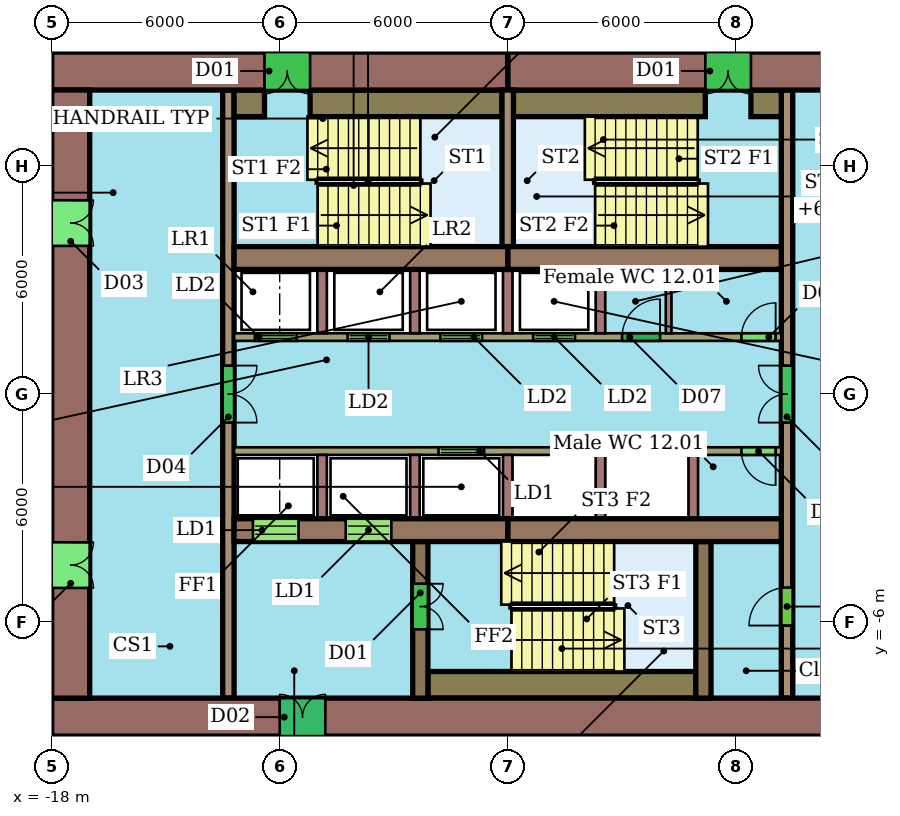
"""IFC4 building model, lengths in metres.
Left out: names, types, materials, properties, quantities, classifications, styles, units other than length and angle.
Written with IfcOpenShell. Run it as: python <this file> out.ifc"""

import sys

from ifc_helpers import new_model, si_unit, direction, frame, frame_2d, origin, place, context, subcontext, project, spatial, rectangle, extrude, element, fill, save


model = new_model("IFC4")
c1 = context("Model", 3, precision=1e-05, world=origin(), true_north=direction((0.0, 1.0)))
c2 = subcontext(c1, "Body", "Model", "MODEL_VIEW")
j1 = project(units=[si_unit("LENGTHUNIT", "METRE"), si_unit("PLANEANGLEUNIT", "RADIAN")], contexts=[c1])
p1 = place(None, origin())
s1 = spatial("IfcSite", under=j1, at=p1, CompositionType="ELEMENT")
p2 = place(p1, origin())
s2 = spatial("IfcBuilding", under=s1, at=p2, CompositionType="ELEMENT")
p3 = place(p2, frame((0.0, 0.0, 61.9)))
s3 = spatial("IfcBuildingStorey", under=s2, at=p3, CompositionType="ELEMENT", Elevation=61.9)
p4 = place(p3, frame((6.0, 8.5, 0.0), z_axis=(0.0, 0.0, 1.0), x_axis=(-1.0, 0.0, 0.0)))
e1 = element("IfcWall", 1, at=p4, inside=s3, PredefinedType="SHEAR", context=c2, shape_type="SweptSolid", body=[
    extrude(rectangle(XDim=12.0, YDim=1.0, at=frame_2d((6.0, 0.0))), origin(), (0.0, 0.0, 1.0), 3.4),
])
p5 = place(p4, frame((5.6, 0.0, 0.0)))
e2 = element("IfcOpeningElement", 2, at=p5, cuts=e1, PredefinedType="OPENING", context=c2, shape_type="SweptSolid", body=[
    extrude(rectangle(XDim=1.2, YDim=2.1, at=frame_2d((0.6, 1.05))), frame((0.0, 0.51, 0.0), z_axis=(0.0, -1.0, 0.0), x_axis=(1.0, 0.0, 0.0)), (0.0, 0.0, 1.0), 1.02),
])
p6 = place(p3, frame((-6.0, 8.5, 0.0), z_axis=(0.0, 0.0, 1.0), x_axis=(-1.0, 0.0, 0.0)))
e3 = element("IfcWall", 3, at=p6, inside=s3, PredefinedType="SHEAR", context=c2, shape_type="SweptSolid", body=[
    extrude(rectangle(XDim=12.0, YDim=1.0, at=frame_2d((6.0, 0.0))), origin(), (0.0, 0.0, 1.0), 3.4),
])
p7 = place(p6, frame((5.2, 0.0, 0.0)))
e4 = element("IfcOpeningElement", 4, at=p7, cuts=e3, PredefinedType="OPENING", context=c2, shape_type="SweptSolid", body=[
    extrude(rectangle(XDim=1.2, YDim=2.1, at=frame_2d((0.6, 1.05))), frame((0.0, 0.51, 0.0), z_axis=(0.0, -1.0, 0.0), x_axis=(1.0, 0.0, 0.0)), (0.0, 0.0, 1.0), 1.02),
])
p8 = place(p3, frame((-18.0, -8.5, 0.0), z_axis=(0.0, 0.0, 1.0), x_axis=(1.0, 0.0, 0.0)))
e5 = element("IfcWall", 5, at=p8, inside=s3, PredefinedType="SHEAR", context=c2, shape_type="SweptSolid", body=[
    extrude(rectangle(XDim=24.0, YDim=1.0, at=frame_2d((12.0, 0.0))), origin(), (0.0, 0.0, 1.0), 3.4),
])
p9 = place(p8, frame((6.0, 0.0, 0.0)))
e6 = element("IfcOpeningElement", 6, at=p9, cuts=e5, PredefinedType="OPENING", context=c2, shape_type="SweptSolid", body=[
    extrude(rectangle(XDim=1.2, YDim=2.1, at=frame_2d((0.6, 1.05))), frame((0.0, 0.51, 0.0), z_axis=(0.0, -1.0, 0.0), x_axis=(1.0, 0.0, 0.0)), (0.0, 0.0, 1.0), 1.02),
])
p10 = place(p3, frame((-17.5, 8.0, 0.0), z_axis=(0.0, 0.0, 1.0), x_axis=(0.0, -1.0, 0.0)))
e7 = element("IfcWall", 7, at=p10, inside=s3, PredefinedType="SHEAR", context=c2, shape_type="SweptSolid", body=[
    extrude(rectangle(XDim=16.0, YDim=1.0, at=frame_2d((8.0, 0.0))), origin(), (0.0, 0.0, 1.0), 3.4),
])
p11 = place(p10, frame((11.9, 0.0, 0.0)))
e8 = element("IfcOpeningElement", 8, at=p11, cuts=e7, PredefinedType="OPENING", context=c2, shape_type="SweptSolid", body=[
    extrude(rectangle(XDim=1.2, YDim=2.1, at=frame_2d((0.6, 1.05))), frame((0.0, 0.51, 0.0), z_axis=(0.0, -1.0, 0.0), x_axis=(1.0, 0.0, 0.0)), (0.0, 0.0, 1.0), 1.02),
])
p12 = place(p10, frame((2.9, 0.0, 0.0)))
e9 = element("IfcOpeningElement", 9, at=p12, cuts=e7, PredefinedType="OPENING", context=c2, shape_type="SweptSolid", body=[
    extrude(rectangle(XDim=1.2, YDim=2.1, at=frame_2d((0.6, 1.05))), frame((0.0, 0.51, 0.0), z_axis=(0.0, -1.0, 0.0), x_axis=(1.0, 0.0, 0.0)), (0.0, 0.0, 1.0), 1.02),
])
for number, where, z_axis, x_axis in (
    (10, (-13.2, 3.58, 0.0), (0.0, 0.0, 1.0), (1.0, 0.0, 0.0)),
    (11, (-6.0, 3.58, 0.0), (0.0, 0.0, 1.0), (1.0, 0.0, 0.0)),
):
    element("IfcWall", number, at=place(p3, frame(where, z_axis=z_axis, x_axis=x_axis)), inside=s3, PredefinedType="SHEAR", context=c2, shape_type="SweptSolid", body=[
        extrude(rectangle(XDim=7.2, YDim=0.6, at=frame_2d((3.6, 0.0))), origin(), (0.0, 0.0, 1.0), 3.4),
    ])
p13 = place(p3, frame((-13.2, -3.58, 0.0), z_axis=(0.0, 0.0, 1.0), x_axis=(1.0, 0.0, 0.0)))
e12 = element("IfcWall", 12, at=p13, inside=s3, PredefinedType="SHEAR", context=c2, shape_type="SweptSolid", body=[
    extrude(rectangle(XDim=7.2, YDim=0.6, at=frame_2d((3.6, 0.0))), origin(), (0.0, 0.0, 1.0), 3.4),
])
p14 = place(p13, frame((0.496, 0.0, 0.0)))
e13 = element("IfcOpeningElement", 13, at=p14, cuts=e12, PredefinedType="OPENING", context=c2, shape_type="SweptSolid", body=[
    extrude(rectangle(XDim=1.2, YDim=2.1, at=frame_2d((0.6, 1.05))), frame((0.0, 0.31, 0.0), z_axis=(0.0, -1.0, 0.0), x_axis=(1.0, 0.0, 0.0)), (0.0, 0.0, 1.0), 0.62),
])
p15 = place(p13, frame((2.938, 0.0, 0.0)))
e14 = element("IfcOpeningElement", 14, at=p15, cuts=e12, PredefinedType="OPENING", context=c2, shape_type="SweptSolid", body=[
    extrude(rectangle(XDim=1.2, YDim=2.1, at=frame_2d((0.6, 1.05))), frame((0.0, 0.31, 0.0), z_axis=(0.0, -1.0, 0.0), x_axis=(1.0, 0.0, 0.0)), (0.0, 0.0, 1.0), 0.62),
])
p16 = place(p3, frame((-6.0, -3.58, 0.0), z_axis=(0.0, 0.0, 1.0), x_axis=(1.0, 0.0, 0.0)))
e15 = element("IfcWall", 15, at=p16, inside=s3, PredefinedType="SHEAR", context=c2, shape_type="SweptSolid", body=[
    extrude(rectangle(XDim=7.2, YDim=0.6, at=frame_2d((3.6, 0.0))), origin(), (0.0, 0.0, 1.0), 3.4),
])
p17 = place(p3, frame((-13.35, 8.0, 0.0), z_axis=(0.0, 0.0, 1.0), x_axis=(0.0, -1.0, 0.0)))
e16 = element("IfcWall", 16, at=p17, inside=s3, PredefinedType="SHEAR", context=c2, shape_type="SweptSolid", body=[
    extrude(rectangle(XDim=16.0, YDim=0.3, at=frame_2d((8.0, 0.0))), origin(), (0.0, 0.0, 1.0), 3.4),
])
p18 = place(p17, frame((7.25, 0.0, 0.0)))
e17 = element("IfcOpeningElement", 17, at=p18, cuts=e16, PredefinedType="OPENING", context=c2, shape_type="SweptSolid", body=[
    extrude(rectangle(XDim=1.5, YDim=2.1, at=frame_2d((0.75, 1.05))), frame((0.0, 0.16, 0.0), z_axis=(0.0, -1.0, 0.0), x_axis=(1.0, 0.0, 0.0)), (0.0, 0.0, 1.0), 0.32),
])
p19 = place(p3, frame((1.35, -8.0, 0.0), z_axis=(0.0, 0.0, 1.0), x_axis=(0.0, 1.0, 0.0)))
e18 = element("IfcWall", 18, at=p19, inside=s3, PredefinedType="SHEAR", context=c2, shape_type="SweptSolid", body=[
    extrude(rectangle(XDim=16.0, YDim=0.3, at=frame_2d((8.0, 0.0))), origin(), (0.0, 0.0, 1.0), 3.4),
])
p20 = place(p19, frame((1.91, 0.0, 0.0)))
e19 = element("IfcOpeningElement", 19, at=p20, cuts=e18, PredefinedType="OPENING", context=c2, shape_type="SweptSolid", body=[
    extrude(rectangle(XDim=1.0, YDim=2.1, at=frame_2d((0.5, 1.05))), frame((0.0, 0.16, 0.0), z_axis=(0.0, -1.0, 0.0), x_axis=(1.0, 0.0, 0.0)), (0.0, 0.0, 1.0), 0.32),
])
p21 = place(p19, frame((7.25, 0.0, 0.0)))
e20 = element("IfcOpeningElement", 20, at=p21, cuts=e18, PredefinedType="OPENING", context=c2, shape_type="SweptSolid", body=[
    extrude(rectangle(XDim=1.5, YDim=2.1, at=frame_2d((0.75, 1.05))), frame((0.0, 0.16, 0.0), z_axis=(0.0, -1.0, 0.0), x_axis=(1.0, 0.0, 0.0)), (0.0, 0.0, 1.0), 0.32),
])
p22 = place(p3, frame((-13.2, 1.5, 0.0), z_axis=(0.0, 0.0, 1.0), x_axis=(1.0, 0.0, 0.0)))
e21 = element("IfcWall", 21, at=p22, inside=s3, PredefinedType="SHEAR", context=c2, shape_type="SweptSolid", body=[
    extrude(rectangle(XDim=14.4, YDim=0.2, at=frame_2d((7.2, 0.0))), origin(), (0.0, 0.0, 1.0), 3.4),
])
p23 = place(p22, frame((0.546, 0.0, 0.0)))
e22 = element("IfcOpeningElement", 22, at=p23, cuts=e21, PredefinedType="OPENING", context=c2, shape_type="SweptSolid", body=[
    extrude(rectangle(XDim=1.1, YDim=2.1, at=frame_2d((0.55, 1.05))), frame((0.0, 0.11, 0.0), z_axis=(0.0, -1.0, 0.0), x_axis=(1.0, 0.0, 0.0)), (0.0, 0.0, 1.0), 0.22),
])
p24 = place(p22, frame((2.988, 0.0, 0.0)))
e23 = element("IfcOpeningElement", 23, at=p24, cuts=e21, PredefinedType="OPENING", context=c2, shape_type="SweptSolid", body=[
    extrude(rectangle(XDim=1.1, YDim=2.1, at=frame_2d((0.55, 1.05))), frame((0.0, 0.11, 0.0), z_axis=(0.0, -1.0, 0.0), x_axis=(1.0, 0.0, 0.0)), (0.0, 0.0, 1.0), 0.22),
])
p25 = place(p22, frame((5.429, 0.0, 0.0)))
e24 = element("IfcOpeningElement", 24, at=p25, cuts=e21, PredefinedType="OPENING", context=c2, shape_type="SweptSolid", body=[
    extrude(rectangle(XDim=1.1, YDim=2.1, at=frame_2d((0.55, 1.05))), frame((0.0, 0.11, 0.0), z_axis=(0.0, -1.0, 0.0), x_axis=(1.0, 0.0, 0.0)), (0.0, 0.0, 1.0), 0.22),
])
p26 = place(p22, frame((7.871, 0.0, 0.0)))
e25 = element("IfcOpeningElement", 25, at=p26, cuts=e21, PredefinedType="OPENING", context=c2, shape_type="SweptSolid", body=[
    extrude(rectangle(XDim=1.1, YDim=2.1, at=frame_2d((0.55, 1.05))), frame((0.0, 0.11, 0.0), z_axis=(0.0, -1.0, 0.0), x_axis=(1.0, 0.0, 0.0)), (0.0, 0.0, 1.0), 0.22),
])
p27 = place(p22, frame((10.21, 0.0, 0.0)))
e26 = element("IfcOpeningElement", 26, at=p27, cuts=e21, PredefinedType="OPENING", context=c2, shape_type="SweptSolid", body=[
    extrude(rectangle(XDim=1.0, YDim=2.1, at=frame_2d((0.5, 1.05))), frame((0.0, 0.11, 0.0), z_axis=(0.0, -1.0, 0.0), x_axis=(1.0, 0.0, 0.0)), (0.0, 0.0, 1.0), 0.22),
])
p28 = place(p22, frame((13.35, 0.0, 0.0)))
e27 = element("IfcOpeningElement", 27, at=p28, cuts=e21, PredefinedType="OPENING", context=c2, shape_type="SweptSolid", body=[
    extrude(rectangle(XDim=0.9, YDim=2.1, at=frame_2d((0.45, 1.05))), frame((0.0, 0.11, 0.0), z_axis=(0.0, -1.0, 0.0), x_axis=(1.0, 0.0, 0.0)), (0.0, 0.0, 1.0), 0.22),
])
p29 = place(p3, frame((1.2, -1.5, 0.0), z_axis=(0.0, 0.0, 1.0), x_axis=(-1.0, 0.0, 0.0)))
e28 = element("IfcWall", 28, at=p29, inside=s3, PredefinedType="SHEAR", context=c2, shape_type="SweptSolid", body=[
    extrude(rectangle(XDim=14.4, YDim=0.2, at=frame_2d((7.2, 0.0))), origin(), (0.0, 0.0, 1.0), 3.4),
])
p30 = place(p29, frame((7.821, 0.0, 0.0)))
e29 = element("IfcOpeningElement", 29, at=p30, cuts=e28, PredefinedType="OPENING", context=c2, shape_type="SweptSolid", body=[
    extrude(rectangle(XDim=1.2, YDim=2.1, at=frame_2d((0.6, 1.05))), frame((0.0, 0.11, 0.0), z_axis=(0.0, -1.0, 0.0), x_axis=(1.0, 0.0, 0.0)), (0.0, 0.0, 1.0), 0.22),
])
p31 = place(p29, frame((0.15, 0.0, 0.0)))
e30 = element("IfcOpeningElement", 30, at=p31, cuts=e28, PredefinedType="OPENING", context=c2, shape_type="SweptSolid", body=[
    extrude(rectangle(XDim=0.9, YDim=2.1, at=frame_2d((0.45, 1.05))), frame((0.0, 0.11, 0.0), z_axis=(0.0, -1.0, 0.0), x_axis=(1.0, 0.0, 0.0)), (0.0, 0.0, 1.0), 0.22),
])
p32 = place(p3, frame((-8.3, -3.88, 0.0), z_axis=(0.0, 0.0, 1.0), x_axis=(0.0, -1.0, 0.0)))
e31 = element("IfcWall", 31, at=p32, inside=s3, PredefinedType="SHEAR", context=c2, shape_type="SweptSolid", body=[
    extrude(rectangle(XDim=4.12, YDim=0.4, at=frame_2d((2.06, 0.0))), origin(), (0.0, 0.0, 1.0), 3.4),
])
p33 = place(p32, frame((1.11, 0.0, 0.0)))
e32 = element("IfcOpeningElement", 32, at=p33, cuts=e31, PredefinedType="OPENING", context=c2, shape_type="SweptSolid", body=[
    extrude(rectangle(XDim=1.2, YDim=2.1, at=frame_2d((0.6, 1.05))), frame((0.0, 0.21, 0.0), z_axis=(0.0, -1.0, 0.0), x_axis=(1.0, 0.0, 0.0)), (0.0, 0.0, 1.0), 0.42),
])
p34 = place(p3, frame((-0.85, -3.88, 0.0), z_axis=(0.0, 0.0, 1.0), x_axis=(0.0, -1.0, 0.0)))
e33 = element("IfcWall", 33, at=p34, inside=s3, PredefinedType="SHEAR", context=c2, shape_type="SweptSolid", body=[
    extrude(rectangle(XDim=4.12, YDim=0.4, at=frame_2d((2.06, 0.0))), origin(), (0.0, 0.0, 1.0), 3.4),
])
p35 = place(p3, frame((-6.0, 3.88, 0.0), z_axis=(0.0, 0.0, 1.0), x_axis=(0.0, 1.0, 0.0)))
e34 = element("IfcWall", 34, at=p35, inside=s3, PredefinedType="SHEAR", context=c2, shape_type="SweptSolid", body=[
    extrude(rectangle(XDim=4.12, YDim=0.3, at=frame_2d((2.06, 0.0))), origin(), (0.0, 0.0, 1.0), 3.4),
])
p36 = place(p3, frame((-13.2, 7.65, 0.0), z_axis=(0.0, 0.0, 1.0), x_axis=(1.0, 0.0, 0.0)))
e35 = element("IfcWall", 35, at=p36, inside=s3, PredefinedType="SHEAR", context=c2, shape_type="SweptSolid", body=[
    extrude(rectangle(XDim=0.8, YDim=0.7, at=frame_2d((0.4, 0.0))), origin(), (0.0, 0.0, 1.0), 3.4),
])
for number, where, z_axis, x_axis in (
    (36, (-11.2, 7.65, 0.0), (0.0, 0.0, 1.0), (1.0, 0.0, 0.0)),
    (37, (-5.85, 7.65, 0.0), (0.0, 0.0, 1.0), (1.0, 0.0, 0.0)),
):
    element("IfcWall", number, at=place(p3, frame(where, z_axis=z_axis, x_axis=x_axis)), inside=s3, PredefinedType="SHEAR", context=c2, shape_type="SweptSolid", body=[
        extrude(rectangle(XDim=5.05, YDim=0.7, at=frame_2d((2.525, 0.0))), origin(), (0.0, 0.0, 1.0), 3.4),
    ])
p37 = place(p3, frame((0.4, 7.65, 0.0), z_axis=(0.0, 0.0, 1.0), x_axis=(1.0, 0.0, 0.0)))
e38 = element("IfcWall", 38, at=p37, inside=s3, PredefinedType="SHEAR", context=c2, shape_type="SweptSolid", body=[
    extrude(rectangle(XDim=0.8, YDim=0.7, at=frame_2d((0.4, 0.0))), origin(), (0.0, 0.0, 1.0), 3.4),
])
p38 = place(p3, frame((-8.1, -7.65, 0.0), z_axis=(0.0, 0.0, 1.0), x_axis=(1.0, 0.0, 0.0)))
e39 = element("IfcWall", 39, at=p38, inside=s3, PredefinedType="SHEAR", context=c2, shape_type="SweptSolid", body=[
    extrude(rectangle(XDim=7.05, YDim=0.7, at=frame_2d((3.525, 0.0))), origin(), (0.0, 0.0, 1.0), 3.4),
])
for number, where, z_axis, x_axis in (
    (40, (-10.883, 1.6, 0.0), (0.0, 0.0, 1.0), (0.0, 1.0, 0.0)),
    (41, (-8.442, 1.6, 0.0), (0.0, 0.0, 1.0), (0.0, 1.0, 0.0)),
    (42, (-6.0, 1.6, 0.0), (0.0, 0.0, 1.0), (0.0, 1.0, 0.0)),
    (43, (-3.558, 1.6, 0.0), (0.0, 0.0, 1.0), (0.0, 1.0, 0.0)),
):
    element("IfcWall", number, at=place(p3, frame(where, z_axis=z_axis, x_axis=x_axis)), inside=s3, PredefinedType="SHEAR", context=c2, shape_type="SweptSolid", body=[
        extrude(rectangle(XDim=1.68, YDim=0.25, at=frame_2d((0.84, 0.0))), origin(), (0.0, 0.0, 1.0), 3.4),
    ])
p39 = place(p3, frame((-1.765, 1.6, 0.0), z_axis=(0.0, 0.0, 1.0), x_axis=(0.0, 1.0, 0.0)))
e44 = element("IfcWall", 44, at=p39, inside=s3, PredefinedType="PARTITIONING", context=c2, shape_type="SweptSolid", body=[
    extrude(rectangle(XDim=1.68, YDim=0.15, at=frame_2d((0.84, 0.0))), origin(), (0.0, 0.0, 1.0), 3.4),
])
for number, where, z_axis, x_axis in (
    (45, (-10.883, -1.6, 0.0), (0.0, 0.0, 1.0), (0.0, -1.0, 0.0)),
    (46, (-8.442, -1.6, 0.0), (0.0, 0.0, 1.0), (0.0, -1.0, 0.0)),
    (47, (-6.0, -1.6, 0.0), (0.0, 0.0, 1.0), (0.0, -1.0, 0.0)),
    (48, (-3.558, -1.6, 0.0), (0.0, 0.0, 1.0), (0.0, -1.0, 0.0)),
    (49, (-1.117, -1.6, 0.0), (0.0, 0.0, 1.0), (0.0, -1.0, 0.0)),
):
    element("IfcWall", number, at=place(p3, frame(where, z_axis=z_axis, x_axis=x_axis)), inside=s3, PredefinedType="SHEAR", context=c2, shape_type="SweptSolid", body=[
        extrude(rectangle(XDim=1.68, YDim=0.25, at=frame_2d((0.84, 0.0))), origin(), (0.0, 0.0, 1.0), 3.4),
    ])
p40 = place(p5, origin())
e50 = element("IfcDoor", 50, at=p40, inside=s3, OperationType="DOUBLE_DOOR_SINGLE_SWING", PredefinedType="NOTDEFINED", context=c2, shape_type="SweptSolid", body=[
    extrude(rectangle(XDim=1.2, YDim=2.1, at=frame_2d((0.6, 1.05))), frame((0.0, 0.025, 0.0), z_axis=(0.0, -1.0, 0.0), x_axis=(1.0, 0.0, 0.0)), (0.0, 0.0, 1.0), 0.05),
])
fill(e2, e50)
p41 = place(p7, origin())
e51 = element("IfcDoor", 51, at=p41, inside=s3, OperationType="DOUBLE_DOOR_SINGLE_SWING", PredefinedType="NOTDEFINED", context=c2, shape_type="SweptSolid", body=[
    extrude(rectangle(XDim=1.2, YDim=2.1, at=frame_2d((0.6, 1.05))), frame((0.0, 0.025, 0.0), z_axis=(0.0, -1.0, 0.0), x_axis=(1.0, 0.0, 0.0)), (0.0, 0.0, 1.0), 0.05),
])
fill(e4, e51)
p42 = place(p9, origin())
e52 = element("IfcDoor", 52, at=p42, inside=s3, OperationType="DOUBLE_DOOR_SINGLE_SWING", PredefinedType="NOTDEFINED", context=c2, shape_type="SweptSolid", body=[
    extrude(rectangle(XDim=1.2, YDim=2.1, at=frame_2d((0.6, 1.05))), frame((0.0, 0.025, 0.0), z_axis=(0.0, -1.0, 0.0), x_axis=(1.0, 0.0, 0.0)), (0.0, 0.0, 1.0), 0.05),
])
fill(e6, e52)
p43 = place(p11, origin())
e53 = element("IfcDoor", 53, at=p43, inside=s3, OperationType="DOUBLE_DOOR_SINGLE_SWING", PredefinedType="NOTDEFINED", context=c2, shape_type="SweptSolid", body=[
    extrude(rectangle(XDim=1.2, YDim=2.1, at=frame_2d((0.6, 1.05))), frame((0.0, 0.025, 0.0), z_axis=(0.0, -1.0, 0.0), x_axis=(1.0, 0.0, 0.0)), (0.0, 0.0, 1.0), 0.05),
])
fill(e8, e53)
p44 = place(p12, origin())
e54 = element("IfcDoor", 54, at=p44, inside=s3, OperationType="DOUBLE_DOOR_SINGLE_SWING", PredefinedType="NOTDEFINED", context=c2, shape_type="SweptSolid", body=[
    extrude(rectangle(XDim=1.2, YDim=2.1, at=frame_2d((0.6, 1.05))), frame((0.0, 0.025, 0.0), z_axis=(0.0, -1.0, 0.0), x_axis=(1.0, 0.0, 0.0)), (0.0, 0.0, 1.0), 0.05),
])
fill(e9, e54)
p45 = place(p14, origin())
e55 = element("IfcDoor", 55, at=p45, inside=s3, OperationType="DOUBLE_DOOR_SLIDING", PredefinedType="NOTDEFINED", context=c2, shape_type="SweptSolid", body=[
    extrude(rectangle(XDim=1.2, YDim=2.1, at=frame_2d((0.6, 1.05))), frame((0.0, 0.025, 0.0), z_axis=(0.0, -1.0, 0.0), x_axis=(1.0, 0.0, 0.0)), (0.0, 0.0, 1.0), 0.05),
])
fill(e13, e55)
p46 = place(p15, origin())
e56 = element("IfcDoor", 56, at=p46, inside=s3, OperationType="DOUBLE_DOOR_SLIDING", PredefinedType="NOTDEFINED", context=c2, shape_type="SweptSolid", body=[
    extrude(rectangle(XDim=1.2, YDim=2.1, at=frame_2d((0.6, 1.05))), frame((0.0, 0.025, 0.0), z_axis=(0.0, -1.0, 0.0), x_axis=(1.0, 0.0, 0.0)), (0.0, 0.0, 1.0), 0.05),
])
fill(e14, e56)
p47 = place(p18, origin())
e57 = element("IfcDoor", 57, at=p47, inside=s3, OperationType="DOUBLE_DOOR_SINGLE_SWING", PredefinedType="NOTDEFINED", context=c2, shape_type="SweptSolid", body=[
    extrude(rectangle(XDim=1.5, YDim=2.1, at=frame_2d((0.75, 1.05))), frame((0.0, 0.025, 0.0), z_axis=(0.0, -1.0, 0.0), x_axis=(1.0, 0.0, 0.0)), (0.0, 0.0, 1.0), 0.05),
])
fill(e17, e57)
p48 = place(p20, origin())
e58 = element("IfcDoor", 58, at=p48, inside=s3, OperationType="SINGLE_SWING_LEFT", PredefinedType="NOTDEFINED", context=c2, shape_type="SweptSolid", body=[
    extrude(rectangle(XDim=1.0, YDim=2.1, at=frame_2d((0.5, 1.05))), frame((0.0, 0.025, 0.0), z_axis=(0.0, -1.0, 0.0), x_axis=(1.0, 0.0, 0.0)), (0.0, 0.0, 1.0), 0.05),
])
fill(e19, e58)
p49 = place(p21, origin())
e59 = element("IfcDoor", 59, at=p49, inside=s3, OperationType="DOUBLE_DOOR_SINGLE_SWING", PredefinedType="NOTDEFINED", context=c2, shape_type="SweptSolid", body=[
    extrude(rectangle(XDim=1.5, YDim=2.1, at=frame_2d((0.75, 1.05))), frame((0.0, 0.025, 0.0), z_axis=(0.0, -1.0, 0.0), x_axis=(1.0, 0.0, 0.0)), (0.0, 0.0, 1.0), 0.05),
])
fill(e20, e59)
p50 = place(p23, origin())
e60 = element("IfcDoor", 60, at=p50, inside=s3, OperationType="DOUBLE_DOOR_SLIDING", PredefinedType="NOTDEFINED", context=c2, shape_type="SweptSolid", body=[
    extrude(rectangle(XDim=1.1, YDim=2.1, at=frame_2d((0.55, 1.05))), frame((0.0, 0.025, 0.0), z_axis=(0.0, -1.0, 0.0), x_axis=(1.0, 0.0, 0.0)), (0.0, 0.0, 1.0), 0.05),
])
fill(e22, e60)
p51 = place(p24, origin())
e61 = element("IfcDoor", 61, at=p51, inside=s3, OperationType="DOUBLE_DOOR_SLIDING", PredefinedType="NOTDEFINED", context=c2, shape_type="SweptSolid", body=[
    extrude(rectangle(XDim=1.1, YDim=2.1, at=frame_2d((0.55, 1.05))), frame((0.0, 0.025, 0.0), z_axis=(0.0, -1.0, 0.0), x_axis=(1.0, 0.0, 0.0)), (0.0, 0.0, 1.0), 0.05),
])
fill(e23, e61)
p52 = place(p25, origin())
e62 = element("IfcDoor", 62, at=p52, inside=s3, OperationType="DOUBLE_DOOR_SLIDING", PredefinedType="NOTDEFINED", context=c2, shape_type="SweptSolid", body=[
    extrude(rectangle(XDim=1.1, YDim=2.1, at=frame_2d((0.55, 1.05))), frame((0.0, 0.025, 0.0), z_axis=(0.0, -1.0, 0.0), x_axis=(1.0, 0.0, 0.0)), (0.0, 0.0, 1.0), 0.05),
])
fill(e24, e62)
p53 = place(p26, origin())
e63 = element("IfcDoor", 63, at=p53, inside=s3, OperationType="DOUBLE_DOOR_SLIDING", PredefinedType="NOTDEFINED", context=c2, shape_type="SweptSolid", body=[
    extrude(rectangle(XDim=1.1, YDim=2.1, at=frame_2d((0.55, 1.05))), frame((0.0, 0.025, 0.0), z_axis=(0.0, -1.0, 0.0), x_axis=(1.0, 0.0, 0.0)), (0.0, 0.0, 1.0), 0.05),
])
fill(e25, e63)
p54 = place(p27, origin())
e64 = element("IfcDoor", 64, at=p54, inside=s3, OperationType="SINGLE_SWING_RIGHT", PredefinedType="NOTDEFINED", context=c2, shape_type="SweptSolid", body=[
    extrude(rectangle(XDim=1.0, YDim=2.1, at=frame_2d((0.5, 1.05))), frame((0.0, 0.025, 0.0), z_axis=(0.0, -1.0, 0.0), x_axis=(1.0, 0.0, 0.0)), (0.0, 0.0, 1.0), 0.05),
])
fill(e26, e64)
p55 = place(p28, origin())
e65 = element("IfcDoor", 65, at=p55, inside=s3, OperationType="SINGLE_SWING_RIGHT", PredefinedType="NOTDEFINED", context=c2, shape_type="SweptSolid", body=[
    extrude(rectangle(XDim=0.9, YDim=2.1, at=frame_2d((0.45, 1.05))), frame((0.0, 0.025, 0.0), z_axis=(0.0, -1.0, 0.0), x_axis=(1.0, 0.0, 0.0)), (0.0, 0.0, 1.0), 0.05),
])
fill(e27, e65)
p56 = place(p30, origin())
e66 = element("IfcDoor", 66, at=p56, inside=s3, OperationType="DOUBLE_DOOR_SLIDING", PredefinedType="NOTDEFINED", context=c2, shape_type="SweptSolid", body=[
    extrude(rectangle(XDim=1.2, YDim=2.1, at=frame_2d((0.6, 1.05))), frame((0.0, 0.025, 0.0), z_axis=(0.0, -1.0, 0.0), x_axis=(1.0, 0.0, 0.0)), (0.0, 0.0, 1.0), 0.05),
])
fill(e29, e66)
p57 = place(p31, origin())
e67 = element("IfcDoor", 67, at=p57, inside=s3, OperationType="SINGLE_SWING_LEFT", PredefinedType="NOTDEFINED", context=c2, shape_type="SweptSolid", body=[
    extrude(rectangle(XDim=0.9, YDim=2.1, at=frame_2d((0.45, 1.05))), frame((0.0, 0.025, 0.0), z_axis=(0.0, -1.0, 0.0), x_axis=(1.0, 0.0, 0.0)), (0.0, 0.0, 1.0), 0.05),
])
fill(e30, e67)
p58 = place(p33, origin())
e68 = element("IfcDoor", 68, at=p58, inside=s3, OperationType="DOUBLE_DOOR_SINGLE_SWING", PredefinedType="NOTDEFINED", context=c2, shape_type="SweptSolid", body=[
    extrude(rectangle(XDim=1.2, YDim=2.1, at=frame_2d((0.6, 1.05))), frame((0.0, 0.025, 0.0), z_axis=(0.0, -1.0, 0.0), x_axis=(1.0, 0.0, 0.0)), (0.0, 0.0, 1.0), 0.05),
])
fill(e32, e68)
save(model, sys.argv[1])
